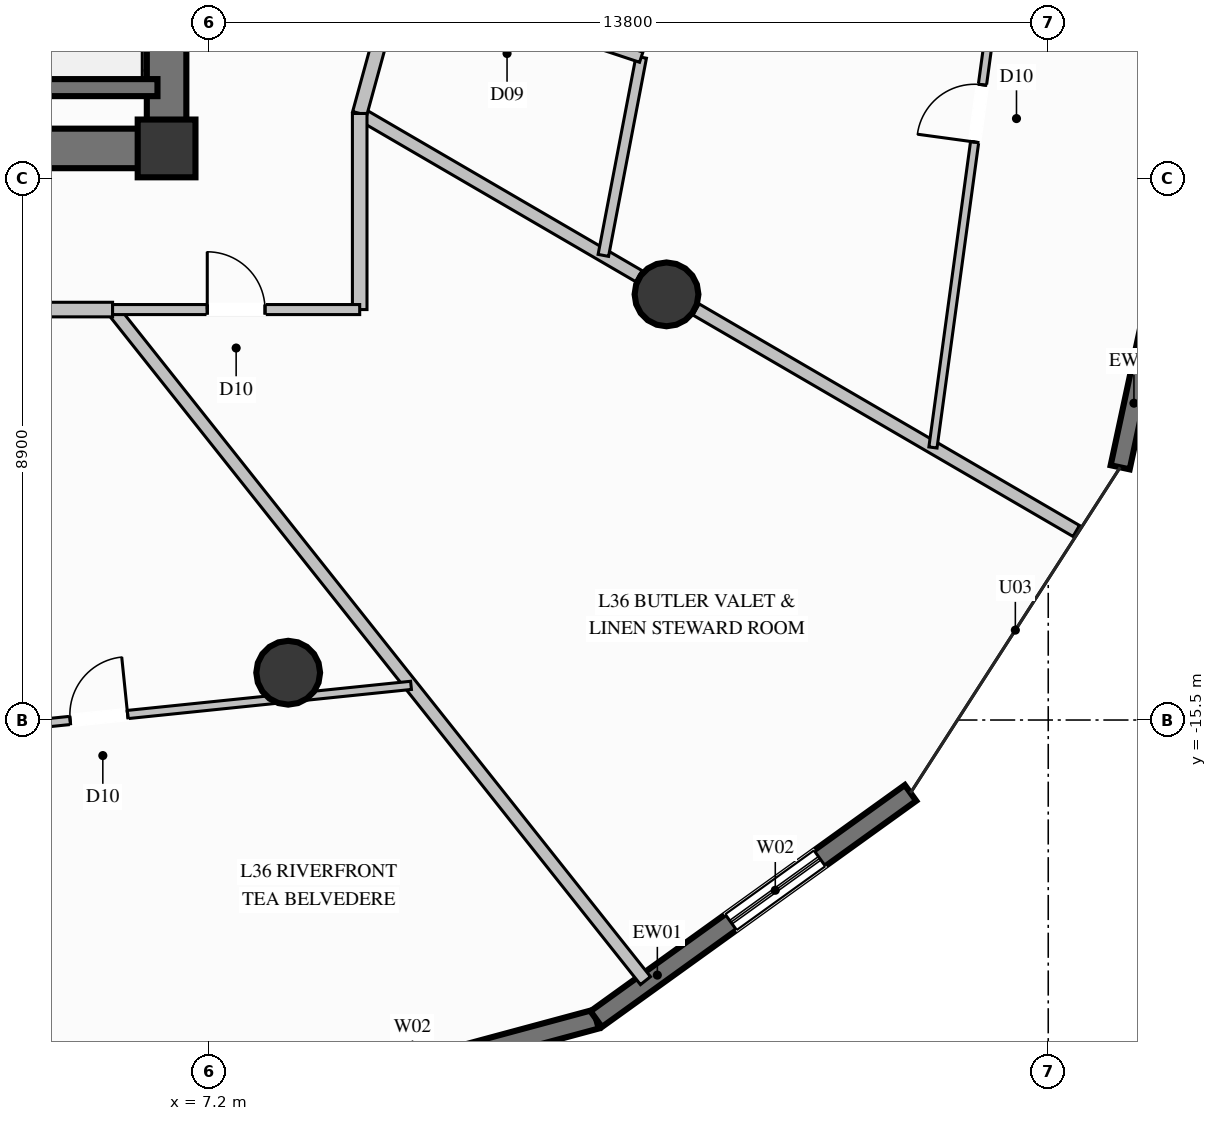
"""IFC4 building model, lengths in metres.
Left out: names, types, materials, properties, quantities, classifications, styles, units other than length and angle.
Written with IfcOpenShell. Run it as: python <this file> out.ifc"""

import sys

from ifc_helpers import new_model, si_unit, direction, frame, frame_2d, origin, origin_2d, place, context, subcontext, project, spatial, rectangle, circle, extrude, element, fill, save


model = new_model("IFC4")
c1 = context("Model", 3, precision=1e-05, world=origin(), true_north=direction((0.0, 1.0)))
c2 = subcontext(c1, "Body", "Model", "MODEL_VIEW")
j1 = project(units=[si_unit("LENGTHUNIT", "METRE"), si_unit("PLANEANGLEUNIT", "RADIAN")], contexts=[c1])
p1 = place(None, origin())
s1 = spatial("IfcSite", under=j1, at=p1, CompositionType="ELEMENT")
p2 = place(p1, origin())
s2 = spatial("IfcBuilding", under=s1, at=p2, CompositionType="ELEMENT")
p3 = place(p2, frame((0.0, 0.0, 142.2)))
s3 = spatial("IfcBuildingStorey", under=s2, at=p3, CompositionType="ELEMENT", Elevation=142.2)
p4 = place(p3, frame((6.5, -6.1, 0.0), z_axis=(0.0, 0.0, 1.0), x_axis=(1.0, 0.0, 0.0)))
e1 = element("IfcColumn", 1, at=p4, inside=s3, PredefinedType="COLUMN", context=c2, shape_type="SweptSolid", body=[
    extrude(rectangle(XDim=0.95, YDim=0.95, at=origin_2d()), origin(), (0.0, 0.0, 1.0), 3.6),
])
p5 = place(p3, frame((4.15, -6.1, 0.0), z_axis=(0.0, 0.0, 1.0), x_axis=(1.0, 0.0, 0.0)))
e2 = element("IfcWall", 2, at=p5, inside=s3, PredefinedType="SHEAR", context=c2, shape_type="SweptSolid", body=[
    extrude(rectangle(XDim=2.025, YDim=0.65, at=frame_2d((1.013, 0.0))), origin(), (0.0, 0.0, 1.0), 3.6),
])
p6 = place(p3, frame((6.5, -6.425, 0.0), z_axis=(0.0, 0.0, 1.0), x_axis=(0.0, 1.0, 0.0)))
e3 = element("IfcWall", 3, at=p6, inside=s3, PredefinedType="SHEAR", context=c2, shape_type="SweptSolid", body=[
    extrude(rectangle(XDim=4.075, YDim=0.65, at=frame_2d((2.038, 0.0))), origin(), (0.0, 0.0, 1.0), 3.6),
])
for number, where, z_axis, x_axis in (
    (4, (8.5, -14.722, 0.0), (0.0, 0.0, 1.0), (1.0, 0.0, 0.0)),
    (5, (14.722, -8.5, 0.0), (0.0, 0.0, 1.0), (1.0, 0.0, 0.0)),
):
    element("IfcColumn", number, at=place(p3, frame(where, z_axis=z_axis, x_axis=x_axis)), inside=s3, PredefinedType="COLUMN", context=c2, shape_type="SweptSolid", body=[
        extrude(circle(Radius=0.525, at=origin_2d()), origin(), (0.0, 0.0, 1.0), 3.6),
    ])
p7 = place(p3, frame((23.572, -4.879, 0.0), z_axis=(0.0, 0.0, 1.0), x_axis=(-0.210040904663, -0.977692599117, 0.0)))
e6 = element("IfcWall", 6, at=p7, inside=s3, PredefinedType="SOLIDWALL", context=c2, shape_type="SweptSolid", body=[
    extrude(rectangle(XDim=6.613, YDim=0.32, at=frame_2d((3.306, 0.0))), origin(), (0.0, 0.0, 1.0), 3.35),
])
p8 = place(p7, frame((2.406, 0.0, 0.35)))
e7 = element("IfcOpeningElement", 7, at=p8, cuts=e6, PredefinedType="OPENING", context=c2, shape_type="SweptSolid", body=[
    extrude(rectangle(XDim=1.8, YDim=2.6, at=frame_2d((0.9, 1.3))), frame((0.0, 0.17, 0.0), z_axis=(0.0, -1.0, 0.0), x_axis=(1.0, 0.0, 0.0)), (0.0, 0.0, 1.0), 0.34),
])
p9 = place(p3, frame((13.565, -20.419, 0.0), z_axis=(0.0, 0.0, 1.0), x_axis=(-0.965496962539, -0.260414314753, 0.0)))
e8 = element("IfcWall", 8, at=p9, inside=s3, PredefinedType="SOLIDWALL", context=c2, shape_type="SweptSolid", body=[
    extrude(rectangle(XDim=6.613, YDim=0.32, at=frame_2d((3.307, 0.0))), origin(), (0.0, 0.0, 1.0), 3.35),
])
p10 = place(p9, frame((2.229, 0.0, 0.35)))
e9 = element("IfcOpeningElement", 9, at=p10, cuts=e8, PredefinedType="OPENING", context=c2, shape_type="SweptSolid", body=[
    extrude(rectangle(XDim=1.8, YDim=2.6, at=frame_2d((0.9, 1.3))), frame((0.0, 0.17, 0.0), z_axis=(0.0, -1.0, 0.0), x_axis=(1.0, 0.0, 0.0)), (0.0, 0.0, 1.0), 0.34),
])
p11 = place(p3, frame((18.735, -16.699, 0.0), z_axis=(0.0, 0.0, 1.0), x_axis=(-0.811724052587, -0.584041147909, 0.0)))
e10 = element("IfcWall", 10, at=p11, inside=s3, PredefinedType="SOLIDWALL", context=c2, shape_type="SweptSolid", body=[
    extrude(rectangle(XDim=6.369, YDim=0.32, at=frame_2d((3.185, 0.0))), origin(), (0.0, 0.0, 1.0), 3.35),
])
p12 = place(p11, frame((1.84, 0.0, 0.35)))
e11 = element("IfcOpeningElement", 11, at=p12, cuts=e10, PredefinedType="OPENING", context=c2, shape_type="SweptSolid", body=[
    extrude(rectangle(XDim=1.8, YDim=2.6, at=frame_2d((0.9, 1.3))), frame((0.0, 0.17, 0.0), z_axis=(0.0, -1.0, 0.0), x_axis=(1.0, 0.0, 0.0)), (0.0, 0.0, 1.0), 0.34),
])
p13 = place(p3, frame((4.15, -5.1, 0.0), z_axis=(0.0, 0.0, 1.0), x_axis=(1.0, 0.0, 0.0)))
e12 = element("IfcWall", 12, at=p13, inside=s3, PredefinedType="SOLIDWALL", context=c2, shape_type="SweptSolid", body=[
    extrude(rectangle(XDim=2.2, YDim=0.28, at=frame_2d((1.1, 0.0))), origin(), (0.0, 0.0, 1.0), 3.35),
])
p14 = place(p3, frame((9.676, -5.525, 0.0), z_axis=(0.0, 0.0, 1.0), x_axis=(0.864030429533, -0.503439586088, 0.0)))
e13 = element("IfcWall", 13, at=p14, inside=s3, PredefinedType="PARTITIONING", context=c2, shape_type="SweptSolid", body=[
    extrude(rectangle(XDim=5.313, YDim=0.21, at=frame_2d((2.657, 0.0))), origin(), (0.0, 0.0, 1.0), 2.718),
])
p15 = place(p3, frame((15.207, -8.748, 0.0), z_axis=(0.0, 0.0, 1.0), x_axis=(0.864082158656, -0.503350795263, 0.0)))
e14 = element("IfcWall", 14, at=p15, inside=s3, PredefinedType="PARTITIONING", context=c2, shape_type="SweptSolid", body=[
    extrude(rectangle(XDim=7.238, YDim=0.21, at=frame_2d((3.619, 0.0))), origin(), (0.0, 0.0, 1.0), 3.35),
])
p16 = place(p3, frame((9.676, -5.525, 0.0), z_axis=(0.0, 0.0, 1.0), x_axis=(0.264467775372, 0.964394522895, 0.0)))
e15 = element("IfcWall", 15, at=p16, inside=s3, PredefinedType="PARTITIONING", context=c2, shape_type="SweptSolid", body=[
    extrude(rectangle(XDim=2.34, YDim=0.24, at=frame_2d((1.17, 0.0))), origin(), (0.0, 0.0, 1.0), 3.35),
])
p17 = place(p3, frame((13.683, -7.859, 0.0), z_axis=(0.0, 0.0, 1.0), x_axis=(0.187717343652, 0.982223090185, 0.0)))
e16 = element("IfcWall", 16, at=p17, inside=s3, PredefinedType="PLUMBINGWALL", context=c2, shape_type="SweptSolid", body=[
    extrude(rectangle(XDim=3.318, YDim=0.175, at=frame_2d((1.659, 0.0))), origin(), (0.0, 0.0, 1.0), 3.35),
])
p18 = place(p3, frame((10.295, -3.268, 0.0), z_axis=(0.0, 0.0, 1.0), x_axis=(0.94903508074, -0.315170454715, 0.0)))
e17 = element("IfcWall", 17, at=p18, inside=s3, PredefinedType="PLUMBINGWALL", context=c2, shape_type="SweptSolid", body=[
    extrude(rectangle(XDim=4.226, YDim=0.175, at=frame_2d((2.113, 0.0))), origin(), (0.0, 0.0, 1.0), 3.35),
])
p19 = place(p18, frame((1.663, 0.0, 0.0)))
e18 = element("IfcOpeningElement", 18, at=p19, cuts=e17, PredefinedType="OPENING", context=c2, shape_type="SweptSolid", body=[
    extrude(rectangle(XDim=0.9, YDim=2.1, at=frame_2d((0.45, 1.05))), frame((0.0, 0.098, 0.0), z_axis=(0.0, -1.0, 0.0), x_axis=(1.0, 0.0, 0.0)), (0.0, 0.0, 1.0), 0.195),
])
p20 = place(p3, frame((19.104, -11.018, 0.0), z_axis=(0.0, 0.0, 1.0), x_axis=(0.135171166516, 0.990822262438, 0.0)))
e19 = element("IfcWall", 19, at=p20, inside=s3, PredefinedType="PARTITIONING", context=c2, shape_type="SweptSolid", body=[
    extrude(rectangle(XDim=11.09, YDim=0.135, at=frame_2d((5.545, 0.0))), origin(), (0.0, 0.0, 1.0), 3.35),
])
p21 = place(p20, frame((5.07, 0.0, 0.0)))
e20 = element("IfcOpeningElement", 20, at=p21, cuts=e19, PredefinedType="OPENING", context=c2, shape_type="SweptSolid", body=[
    extrude(rectangle(XDim=0.95, YDim=2.1, at=frame_2d((0.475, 1.05))), frame((0.0, 0.078, 0.0), z_axis=(0.0, -1.0, 0.0), x_axis=(1.0, 0.0, 0.0)), (0.0, 0.0, 1.0), 0.155),
])
p22 = place(p3, frame((5.612, -8.75, 0.0), z_axis=(0.0, 0.0, 1.0), x_axis=(0.621887455735, -0.78310662901, 0.0)))
e21 = element("IfcWall", 21, at=p22, inside=s3, PredefinedType="PARTITIONING", context=c2, shape_type="SweptSolid", body=[
    extrude(rectangle(XDim=14.093, YDim=0.21, at=frame_2d((7.046, 0.0))), origin(), (0.0, 0.0, 1.0), 3.35),
])
p23 = place(p3, frame((0.0, -8.75, 0.0), z_axis=(0.0, 0.0, 1.0), x_axis=(1.0, 0.0, 0.0)))
e22 = element("IfcWall", 22, at=p23, inside=s3, PredefinedType="PARTITIONING", context=c2, shape_type="SweptSolid", body=[
    extrude(rectangle(XDim=5.612, YDim=0.24, at=frame_2d((2.806, 0.0))), origin(), (0.0, 0.0, 1.0), 3.35),
])
p24 = place(p3, frame((0.254, -15.986, 0.0), z_axis=(0.0, 0.0, 1.0), x_axis=(0.994749746349, 0.102337393643, 0.0)))
e23 = element("IfcWall", 23, at=p24, inside=s3, PredefinedType="PARTITIONING", context=c2, shape_type="SweptSolid", body=[
    extrude(rectangle(XDim=10.32, YDim=0.135, at=frame_2d((5.16, 0.0))), origin(), (0.0, 0.0, 1.0), 2.879),
])
p25 = place(p24, frame((4.685, 0.0, 0.0)))
e24 = element("IfcOpeningElement", 24, at=p25, cuts=e23, PredefinedType="OPENING", context=c2, shape_type="SweptSolid", body=[
    extrude(rectangle(XDim=0.95, YDim=2.1, at=frame_2d((0.475, 1.05))), frame((0.0, 0.078, 0.0), z_axis=(0.0, -1.0, 0.0), x_axis=(1.0, 0.0, 0.0)), (0.0, 0.0, 1.0), 0.155),
])
p26 = place(p3, frame((9.676, -8.75, 0.0), z_axis=(0.0, 0.0, 1.0), x_axis=(0.0, 1.0, 0.0)))
e25 = element("IfcWall", 25, at=p26, inside=s3, PredefinedType="PARTITIONING", context=c2, shape_type="SweptSolid", body=[
    extrude(rectangle(XDim=3.225, YDim=0.24, at=frame_2d((1.613, 0.0))), origin(), (0.0, 0.0, 1.0), 3.35),
])
p27 = place(p3, frame((5.612, -8.75, 0.0), z_axis=(0.0, 0.0, 1.0), x_axis=(1.0, 0.0, 0.0)))
e26 = element("IfcWall", 26, at=p27, inside=s3, PredefinedType="PARTITIONING", context=c2, shape_type="SweptSolid", body=[
    extrude(rectangle(XDim=4.064, YDim=0.165, at=frame_2d((2.032, 0.0))), origin(), (0.0, 0.0, 1.0), 3.35),
])
p28 = place(p27, frame((1.557, 0.0, 0.0)))
e27 = element("IfcOpeningElement", 27, at=p28, cuts=e26, PredefinedType="OPENING", context=c2, shape_type="SweptSolid", body=[
    extrude(rectangle(XDim=0.95, YDim=2.1, at=frame_2d((0.475, 1.05))), frame((0.0, 0.093, 0.0), z_axis=(0.0, -1.0, 0.0), x_axis=(1.0, 0.0, 0.0)), (0.0, 0.0, 1.0), 0.185),
])
p29 = place(p12, origin())
e28 = element("IfcWindow", 28, at=p29, inside=s3, PartitioningType="SINGLE_PANEL", PredefinedType="WINDOW", context=c2, shape_type="SweptSolid", body=[
    extrude(rectangle(XDim=1.8, YDim=2.6, at=frame_2d((0.9, 1.3))), frame((0.0, 0.03, 0.0), z_axis=(0.0, -1.0, 0.0), x_axis=(1.0, 0.0, 0.0)), (0.0, 0.0, 1.0), 0.06),
])
fill(e11, e28)
p30 = place(p21, origin())
e29 = element("IfcDoor", 29, at=p30, inside=s3, OperationType="SINGLE_SWING_LEFT", PredefinedType="DOOR", context=c2, shape_type="SweptSolid", body=[
    extrude(rectangle(XDim=0.95, YDim=2.1, at=frame_2d((0.475, 1.05))), frame((0.0, 0.025, 0.0), z_axis=(0.0, -1.0, 0.0), x_axis=(1.0, 0.0, 0.0)), (0.0, 0.0, 1.0), 0.05),
])
fill(e20, e29)
p31 = place(p25, origin())
e30 = element("IfcDoor", 30, at=p31, inside=s3, OperationType="SINGLE_SWING_RIGHT", PredefinedType="DOOR", context=c2, shape_type="SweptSolid", body=[
    extrude(rectangle(XDim=0.95, YDim=2.1, at=frame_2d((0.475, 1.05))), frame((0.0, 0.025, 0.0), z_axis=(0.0, -1.0, 0.0), x_axis=(1.0, 0.0, 0.0)), (0.0, 0.0, 1.0), 0.05),
])
fill(e24, e30)
p32 = place(p28, origin())
e31 = element("IfcDoor", 31, at=p32, inside=s3, OperationType="SINGLE_SWING_LEFT", PredefinedType="DOOR", context=c2, shape_type="SweptSolid", body=[
    extrude(rectangle(XDim=0.95, YDim=2.1, at=frame_2d((0.475, 1.05))), frame((0.0, 0.025, 0.0), z_axis=(0.0, -1.0, 0.0), x_axis=(1.0, 0.0, 0.0)), (0.0, 0.0, 1.0), 0.05),
])
fill(e27, e31)
save(model, sys.argv[1])
